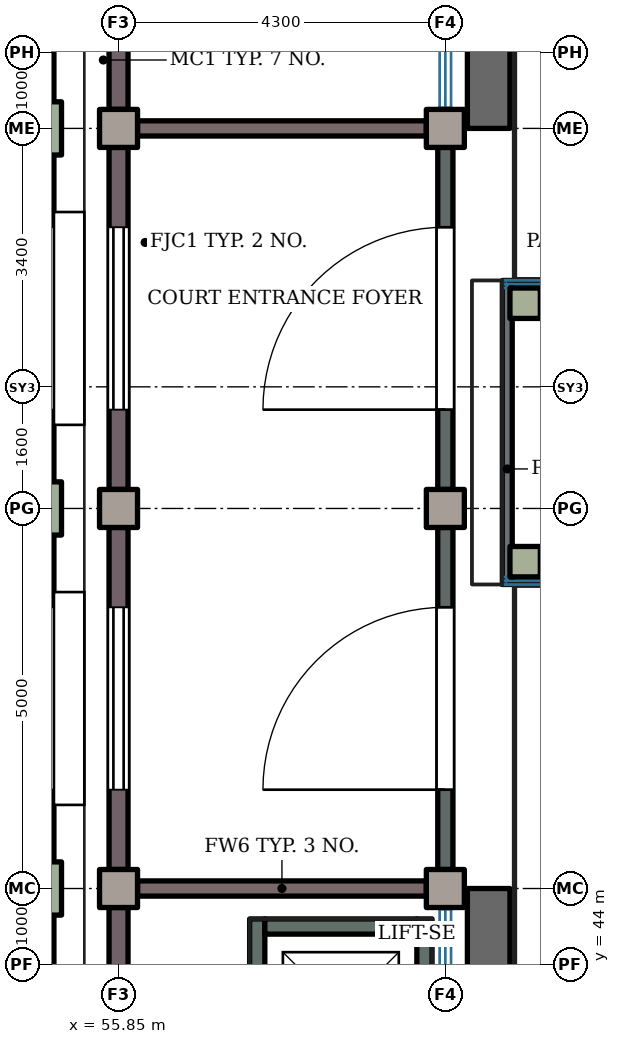
"""IFC4 building model, lengths in metres.
Left out: names, types, materials, properties, quantities, classifications, styles, units other than length and angle.
Written with IfcOpenShell. Run it as: python <this file> out.ifc"""

import sys

from ifc_helpers import new_model, si_unit, direction, frame, frame_2d, origin, origin_2d, place, context, subcontext, project, spatial, rectangle, extrude, element, fill, save


model = new_model("IFC4")
c1 = context("Model", 3, precision=1e-05, world=origin(), true_north=direction((0.0, 1.0)))
c2 = subcontext(c1, "Body", "Model", "MODEL_VIEW")
j1 = project(units=[si_unit("LENGTHUNIT", "METRE"), si_unit("PLANEANGLEUNIT", "RADIAN")], contexts=[c1])
p1 = place(None, origin())
s1 = spatial("IfcSite", under=j1, at=p1, CompositionType="ELEMENT")
p2 = place(p1, origin())
s2 = spatial("IfcBuilding", under=s1, at=p2, CompositionType="ELEMENT")
p3 = place(p2, origin())
s3 = spatial("IfcBuildingStorey", under=s2, at=p3, CompositionType="ELEMENT", Elevation=0.0)
for number, where, z_axis, x_axis in (
    (1, (54.75, 45.0, 0.0), (0.0, 0.0, 1.0), (1.0, 0.0, 0.0)),
    (2, (54.75, 50.0, 0.0), (0.0, 0.0, 1.0), (1.0, 0.0, 0.0)),
    (3, (54.75, 55.0, 0.0), (0.0, 0.0, 1.0), (1.0, 0.0, 0.0)),
):
    element("IfcColumn", number, at=place(p3, frame(where, z_axis=z_axis, x_axis=x_axis)), inside=s3, PredefinedType="COLUMN", context=c2, shape_type="SweptSolid", body=[
        extrude(rectangle(XDim=0.7, YDim=0.7, at=origin_2d()), origin(), (0.0, 0.0, 1.0), 4.2),
    ])
p4 = place(p3, frame((54.75, 40.351, 0.0), z_axis=(0.0, 0.0, 1.0), x_axis=(0.0, 1.0, 0.0)))
e4 = element("IfcWall", 4, at=p4, inside=s3, PredefinedType="SHEAR", context=c2, shape_type="SweptSolid", body=[
    extrude(rectangle(XDim=4.299, YDim=0.5, at=frame_2d((2.149, 0.0))), origin(), (0.0, 0.0, 1.0), 3.4),
])
p5 = place(p3, frame((54.75, 45.351, 0.0), z_axis=(0.0, 0.0, 1.0), x_axis=(0.0, 1.0, 0.0)))
e5 = element("IfcWall", 5, at=p5, inside=s3, PredefinedType="SHEAR", context=c2, shape_type="SweptSolid", body=[
    extrude(rectangle(XDim=4.299, YDim=0.5, at=frame_2d((2.149, 0.0))), origin(), (0.0, 0.0, 1.0), 3.4),
])
p6 = place(p5, frame((0.949, 0.0, 0.0)))
e6 = element("IfcOpeningElement", 6, at=p6, cuts=e5, PredefinedType="OPENING", context=c2, shape_type="SweptSolid", body=[
    extrude(rectangle(XDim=2.4, YDim=3.2, at=frame_2d((1.2, 1.6))), frame((0.0, 0.26, 0.0), z_axis=(0.0, -1.0, 0.0), x_axis=(1.0, 0.0, 0.0)), (0.0, 0.0, 1.0), 0.52),
])
p7 = place(p3, frame((54.75, 50.351, 0.0), z_axis=(0.0, 0.0, 1.0), x_axis=(0.0, 1.0, 0.0)))
e7 = element("IfcWall", 7, at=p7, inside=s3, PredefinedType="SHEAR", context=c2, shape_type="SweptSolid", body=[
    extrude(rectangle(XDim=4.299, YDim=0.5, at=frame_2d((2.149, 0.0))), origin(), (0.0, 0.0, 1.0), 3.4),
])
p8 = place(p7, frame((0.949, 0.0, 0.0)))
e8 = element("IfcOpeningElement", 8, at=p8, cuts=e7, PredefinedType="OPENING", context=c2, shape_type="SweptSolid", body=[
    extrude(rectangle(XDim=2.4, YDim=3.2, at=frame_2d((1.2, 1.6))), frame((0.0, 0.26, 0.0), z_axis=(0.0, -1.0, 0.0), x_axis=(1.0, 0.0, 0.0)), (0.0, 0.0, 1.0), 0.52),
])
p9 = place(p3, frame((54.75, 55.351, 0.0), z_axis=(0.0, 0.0, 1.0), x_axis=(0.0, 1.0, 0.0)))
e9 = element("IfcWall", 9, at=p9, inside=s3, PredefinedType="SHEAR", context=c2, shape_type="SweptSolid", body=[
    extrude(rectangle(XDim=4.299, YDim=0.5, at=frame_2d((2.149, 0.0))), origin(), (0.0, 0.0, 1.0), 3.4),
])
for number, where, z_axis, x_axis in (
    (10, (55.85, 45.0, 0.0), (0.0, 0.0, 1.0), (1.0, 0.0, 0.0)),
    (11, (55.85, 50.0, 0.0), (0.0, 0.0, 1.0), (1.0, 0.0, 0.0)),
    (12, (55.85, 55.0, 0.0), (0.0, 0.0, 1.0), (1.0, 0.0, 0.0)),
    (13, (60.15, 45.0, 0.0), (0.0, 0.0, 1.0), (1.0, 0.0, 0.0)),
    (14, (60.15, 50.0, 0.0), (0.0, 0.0, 1.0), (1.0, 0.0, 0.0)),
    (15, (60.15, 55.0, 0.0), (0.0, 0.0, 1.0), (1.0, 0.0, 0.0)),
):
    element("IfcColumn", number, at=place(p3, frame(where, z_axis=z_axis, x_axis=x_axis)), inside=s3, PredefinedType="COLUMN", context=c2, shape_type="SweptSolid", body=[
        extrude(rectangle(XDim=0.5, YDim=0.5, at=origin_2d()), origin(), (0.0, 0.0, 1.0), 4.2),
    ])
p10 = place(p3, frame((55.85, 40.25, 0.0), z_axis=(0.0, 0.0, 1.0), x_axis=(0.0, 1.0, 0.0)))
e16 = element("IfcWall", 16, at=p10, inside=s3, PredefinedType="SHEAR", context=c2, shape_type="SweptSolid", body=[
    extrude(rectangle(XDim=4.499, YDim=0.25, at=frame_2d((2.25, 0.0))), origin(), (0.0, 0.0, 1.0), 3.6),
])
p11 = place(p3, frame((55.85, 45.25, 0.0), z_axis=(0.0, 0.0, 1.0), x_axis=(0.0, 1.0, 0.0)))
e17 = element("IfcWall", 17, at=p11, inside=s3, PredefinedType="SHEAR", context=c2, shape_type="SweptSolid", body=[
    extrude(rectangle(XDim=4.499, YDim=0.25, at=frame_2d((2.25, 0.0))), origin(), (0.0, 0.0, 1.0), 3.6),
])
p12 = place(p11, frame((1.05, 0.0, 0.0)))
e18 = element("IfcOpeningElement", 18, at=p12, cuts=e17, PredefinedType="OPENING", context=c2, shape_type="SweptSolid", body=[
    extrude(rectangle(XDim=2.4, YDim=2.6, at=frame_2d((1.2, 1.3))), frame((0.0, 0.135, 0.0), z_axis=(0.0, -1.0, 0.0), x_axis=(1.0, 0.0, 0.0)), (0.0, 0.0, 1.0), 0.27),
])
p13 = place(p3, frame((55.85, 50.25, 0.0), z_axis=(0.0, 0.0, 1.0), x_axis=(0.0, 1.0, 0.0)))
e19 = element("IfcWall", 19, at=p13, inside=s3, PredefinedType="SHEAR", context=c2, shape_type="SweptSolid", body=[
    extrude(rectangle(XDim=4.499, YDim=0.25, at=frame_2d((2.25, 0.0))), origin(), (0.0, 0.0, 1.0), 3.6),
])
p14 = place(p13, frame((1.05, 0.0, 0.0)))
e20 = element("IfcOpeningElement", 20, at=p14, cuts=e19, PredefinedType="OPENING", context=c2, shape_type="SweptSolid", body=[
    extrude(rectangle(XDim=2.4, YDim=2.6, at=frame_2d((1.2, 1.3))), frame((0.0, 0.135, 0.0), z_axis=(0.0, -1.0, 0.0), x_axis=(1.0, 0.0, 0.0)), (0.0, 0.0, 1.0), 0.27),
])
p15 = place(p3, frame((55.85, 55.25, 0.0), z_axis=(0.0, 0.0, 1.0), x_axis=(0.0, 1.0, 0.0)))
e21 = element("IfcWall", 21, at=p15, inside=s3, PredefinedType="SHEAR", context=c2, shape_type="SweptSolid", body=[
    extrude(rectangle(XDim=4.499, YDim=0.25, at=frame_2d((2.25, 0.0))), origin(), (0.0, 0.0, 1.0), 3.6),
])
for number, where, z_axis, x_axis in (
    (22, (61.2, 49.3, 0.0), (0.0, 0.0, 1.0), (1.0, 0.0, 0.0)),
    (23, (61.2, 52.7, 0.0), (0.0, 0.0, 1.0), (1.0, 0.0, 0.0)),
):
    element("IfcColumn", number, at=place(p3, frame(where, z_axis=z_axis, x_axis=x_axis)), inside=s3, PredefinedType="COLUMN", context=c2, shape_type="SweptSolid", body=[
        extrude(rectangle(XDim=0.4, YDim=0.4, at=origin_2d()), origin(), (0.0, 0.0, 1.0), 3.84),
    ])
p16 = place(p3, frame((60.965, 49.0, 4.0), z_axis=(0.0, 0.0, 1.0), x_axis=(0.0, 1.0, 0.0)))
e24 = element("IfcWall", 24, at=p16, inside=s3, PredefinedType="PARAPET", context=c2, shape_type="SweptSolid", body=[
    extrude(rectangle(XDim=4.0, YDim=0.13, at=frame_2d((2.0, 0.0))), origin(), (0.0, 0.0, 1.0), 0.45),
])
for number, where, z_axis, x_axis in (
    (25, (61.03, 49.065, 4.0), (0.0, 0.0, 1.0), (1.0, 0.0, 0.0)),
    (26, (61.03, 52.935, 4.0), (0.0, 0.0, 1.0), (1.0, 0.0, 0.0)),
):
    element("IfcWall", number, at=place(p3, frame(where, z_axis=z_axis, x_axis=x_axis)), inside=s3, PredefinedType="PARAPET", context=c2, shape_type="SweptSolid", body=[
        extrude(rectangle(XDim=2.84, YDim=0.13, at=frame_2d((1.42, 0.0))), origin(), (0.0, 0.0, 1.0), 0.45),
    ])
p17 = place(p3, frame((60.15, 45.25, 0.0), z_axis=(0.0, 0.0, 1.0), x_axis=(0.0, 1.0, 0.0)))
e27 = element("IfcWall", 27, at=p17, inside=s3, PredefinedType="STANDARD", context=c2, shape_type="SweptSolid", body=[
    extrude(rectangle(XDim=4.499, YDim=0.2, at=frame_2d((2.25, 0.0))), origin(), (0.0, 0.0, 1.0), 3.5),
])
p18 = place(p17, frame((1.05, 0.0, 0.0)))
e28 = element("IfcOpeningElement", 28, at=p18, cuts=e27, PredefinedType="OPENING", context=c2, shape_type="SweptSolid", body=[
    extrude(rectangle(XDim=2.4, YDim=2.6, at=frame_2d((1.2, 1.3))), frame((0.0, 0.11, 0.0), z_axis=(0.0, -1.0, 0.0), x_axis=(1.0, 0.0, 0.0)), (0.0, 0.0, 1.0), 0.22),
])
p19 = place(p3, frame((60.15, 50.25, 0.0), z_axis=(0.0, 0.0, 1.0), x_axis=(0.0, 1.0, 0.0)))
e29 = element("IfcWall", 29, at=p19, inside=s3, PredefinedType="STANDARD", context=c2, shape_type="SweptSolid", body=[
    extrude(rectangle(XDim=4.499, YDim=0.2, at=frame_2d((2.25, 0.0))), origin(), (0.0, 0.0, 1.0), 3.5),
])
p20 = place(p19, frame((1.05, 0.0, 0.0)))
e30 = element("IfcOpeningElement", 30, at=p20, cuts=e29, PredefinedType="OPENING", context=c2, shape_type="SweptSolid", body=[
    extrude(rectangle(XDim=2.4, YDim=2.6, at=frame_2d((1.2, 1.3))), frame((0.0, 0.11, 0.0), z_axis=(0.0, -1.0, 0.0), x_axis=(1.0, 0.0, 0.0)), (0.0, 0.0, 1.0), 0.22),
])
for number, where, z_axis, x_axis in (
    (31, (60.72, 40.0, 0.0), (0.0, 0.0, 1.0), (0.0, 1.0, 0.0)),
    (32, (60.72, 55.0, 0.0), (0.0, 0.0, 1.0), (0.0, 1.0, 0.0)),
):
    element("IfcWall", number, at=place(p3, frame(where, z_axis=z_axis, x_axis=x_axis)), inside=s3, PredefinedType="STANDARD", context=c2, shape_type="SweptSolid", body=[
        extrude(rectangle(XDim=5.0, YDim=0.56, at=frame_2d((2.5, 0.0))), origin(), (0.0, 0.0, 1.0), 0.3),
    ])
for number, where, z_axis, x_axis in (
    (33, (56.1, 45.0, 0.0), (0.0, 0.0, 1.0), (1.0, 0.0, 0.0)),
    (34, (56.1, 55.0, 0.0), (0.0, 0.0, 1.0), (1.0, 0.0, 0.0)),
):
    element("IfcWall", number, at=place(p3, frame(where, z_axis=z_axis, x_axis=x_axis)), inside=s3, PredefinedType="STANDARD", context=c2, shape_type="SweptSolid", body=[
        extrude(rectangle(XDim=3.8, YDim=0.2, at=frame_2d((1.9, 0.0))), origin(), (0.0, 0.0, 1.0), 4.0),
    ])
p21 = place(p3, frame((57.675, 42.2, -0.75), z_axis=(0.0, 0.0, 1.0), x_axis=(0.0, 1.0, 0.0)))
e35 = element("IfcWall", 35, at=p21, inside=s3, PredefinedType="SHEAR", context=c2, shape_type="SweptSolid", body=[
    extrude(rectangle(XDim=2.4, YDim=0.2, at=frame_2d((1.2, 0.0))), origin(), (0.0, 0.0, 1.0), 4.95),
])
p22 = place(p21, frame((0.7, 0.0, 0.75)))
e36 = element("IfcOpeningElement", 36, at=p22, cuts=e35, PredefinedType="OPENING", context=c2, shape_type="SweptSolid", body=[
    extrude(rectangle(XDim=1.0, YDim=2.1, at=frame_2d((0.5, 1.05))), frame((0.0, 0.11, 0.0), z_axis=(0.0, -1.0, 0.0), x_axis=(1.0, 0.0, 0.0)), (0.0, 0.0, 1.0), 0.22),
])
p23 = place(p3, frame((59.875, 42.2, -0.75), z_axis=(0.0, 0.0, 1.0), x_axis=(0.0, 1.0, 0.0)))
e37 = element("IfcWall", 37, at=p23, inside=s3, PredefinedType="SHEAR", context=c2, shape_type="SweptSolid", body=[
    extrude(rectangle(XDim=2.4, YDim=0.2, at=frame_2d((1.2, 0.0))), origin(), (0.0, 0.0, 1.0), 4.95),
])
p24 = place(p3, frame((57.775, 44.5, -0.75), z_axis=(0.0, 0.0, 1.0), x_axis=(1.0, 0.0, 0.0)))
e38 = element("IfcWall", 38, at=p24, inside=s3, PredefinedType="SHEAR", context=c2, shape_type="SweptSolid", body=[
    extrude(rectangle(XDim=2.0, YDim=0.2, at=frame_2d((1.0, 0.0))), origin(), (0.0, 0.0, 1.0), 4.95),
])
p25 = place(p18, origin())
e39 = element("IfcDoor", 39, at=p25, inside=s3, OperationType="DOUBLE_DOOR_DOUBLE_SWING", PredefinedType="DOOR", context=c2, shape_type="SweptSolid", body=[
    extrude(rectangle(XDim=2.4, YDim=2.6, at=frame_2d((1.2, 1.3))), frame((0.0, 0.025, 0.0), z_axis=(0.0, -1.0, 0.0), x_axis=(1.0, 0.0, 0.0)), (0.0, 0.0, 1.0), 0.05),
])
fill(e28, e39)
p26 = place(p20, origin())
e40 = element("IfcDoor", 40, at=p26, inside=s3, OperationType="DOUBLE_DOOR_DOUBLE_SWING", PredefinedType="DOOR", context=c2, shape_type="SweptSolid", body=[
    extrude(rectangle(XDim=2.4, YDim=2.6, at=frame_2d((1.2, 1.3))), frame((0.0, 0.025, 0.0), z_axis=(0.0, -1.0, 0.0), x_axis=(1.0, 0.0, 0.0)), (0.0, 0.0, 1.0), 0.05),
])
fill(e30, e40)
p27 = place(p12, origin())
e41 = element("IfcDoor", 41, at=p27, inside=s3, OperationType="DOUBLE_DOOR_SLIDING", PredefinedType="DOOR", context=c2, shape_type="SweptSolid", body=[
    extrude(rectangle(XDim=2.4, YDim=2.6, at=frame_2d((1.2, 1.3))), frame((0.0, 0.025, 0.0), z_axis=(0.0, -1.0, 0.0), x_axis=(1.0, 0.0, 0.0)), (0.0, 0.0, 1.0), 0.05),
])
fill(e18, e41)
p28 = place(p14, origin())
e42 = element("IfcDoor", 42, at=p28, inside=s3, OperationType="DOUBLE_DOOR_SLIDING", PredefinedType="DOOR", context=c2, shape_type="SweptSolid", body=[
    extrude(rectangle(XDim=2.4, YDim=2.6, at=frame_2d((1.2, 1.3))), frame((0.0, 0.025, 0.0), z_axis=(0.0, -1.0, 0.0), x_axis=(1.0, 0.0, 0.0)), (0.0, 0.0, 1.0), 0.05),
])
fill(e20, e42)
save(model, sys.argv[1])
